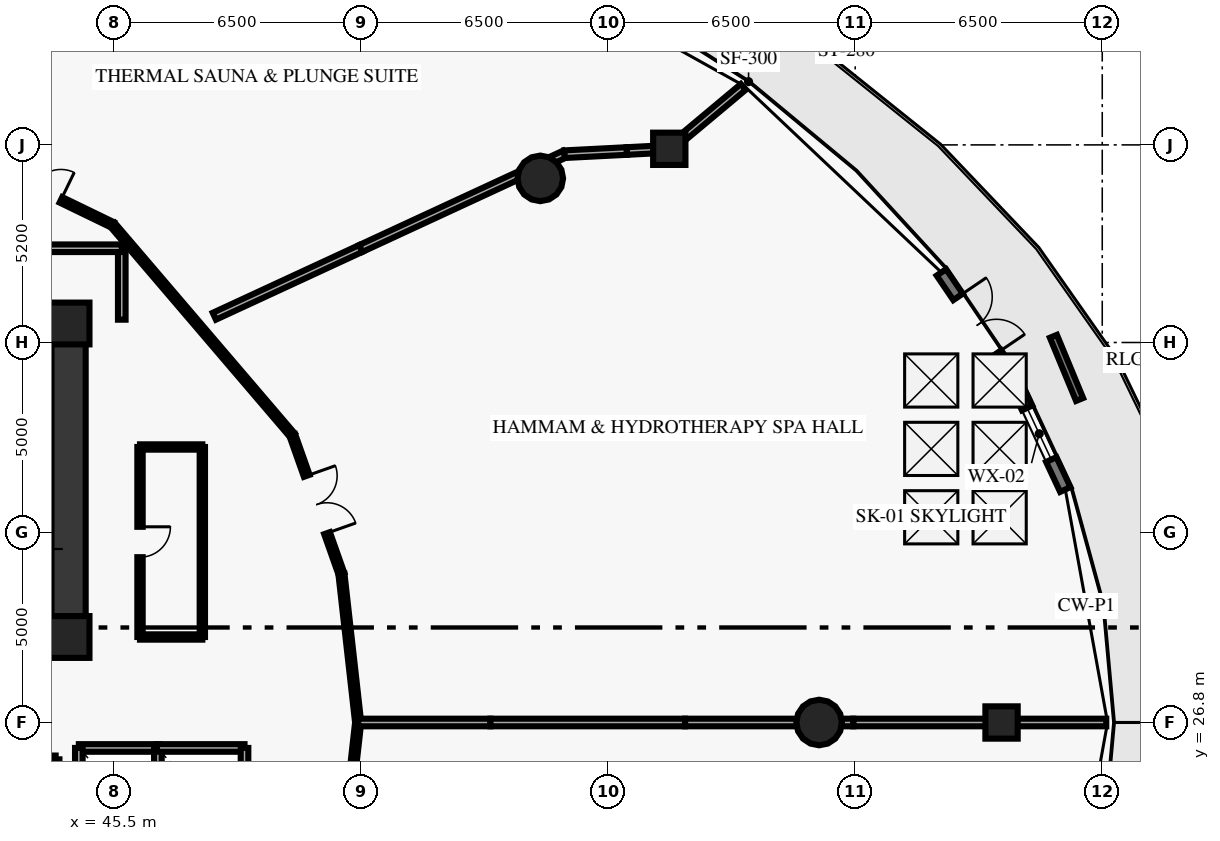
"""IFC4 building model, lengths in metres.
Left out: names, types, materials, properties, quantities, classifications, styles, units other than length and angle.
Written with IfcOpenShell. Run it as: python <this file> out.ifc"""

import sys

from ifc_helpers import new_model, si_unit, direction, frame, frame_2d, origin, origin_2d, place, context, subcontext, project, spatial, rectangle, circle, extrude, element, fill, save


model = new_model("IFC4")
c1 = context("Model", 3, precision=1e-05, world=origin(), true_north=direction((0.0, 1.0)))
c2 = subcontext(c1, "Body", "Model", "MODEL_VIEW")
j1 = project(units=[si_unit("LENGTHUNIT", "METRE"), si_unit("PLANEANGLEUNIT", "RADIAN")], contexts=[c1])
p1 = place(None, origin())
s1 = spatial("IfcSite", under=j1, at=p1, CompositionType="ELEMENT")
p2 = place(p1, origin())
s2 = spatial("IfcBuilding", under=s1, at=p2, CompositionType="ELEMENT")
p3 = place(p2, frame((0.0, 0.0, 16.0)))
s3 = spatial("IfcBuildingStorey", under=s2, at=p3, CompositionType="ELEMENT", Elevation=16.0)
for number, where, z_axis, x_axis in (
    (1, (44.3, 29.05, 0.0), (0.0, 0.0, 1.0), (1.0, 0.0, 0.0)),
    (2, (44.3, 37.3, 0.0), (0.0, 0.0, 1.0), (1.0, 0.0, 0.0)),
):
    element("IfcColumn", number, at=place(p3, frame(where, z_axis=z_axis, x_axis=x_axis)), inside=s3, PredefinedType="PILASTER", context=c2, shape_type="SweptSolid", body=[
        extrude(rectangle(XDim=1.1, YDim=1.1, at=origin_2d()), origin(), (0.0, 0.0, 1.0), 4.74),
    ])
for number, where, z_axis, x_axis in (
    (3, (64.05, 26.8, 0.0), (0.0, 0.0, 1.0), (1.0, 0.0, 0.0)),
    (4, (56.713, 41.119, 0.0), (0.0, 0.0, 1.0), (1.0, 0.0, 0.0)),
):
    element("IfcColumn", number, at=place(p3, frame(where, z_axis=z_axis, x_axis=x_axis)), inside=s3, PredefinedType="COLUMN", context=c2, shape_type="SweptSolid", body=[
        extrude(circle(Radius=0.6, at=origin_2d()), origin(), (0.0, 0.0, 1.0), 4.74),
    ])
for number, where, z_axis, x_axis in (
    (5, (68.85, 26.8, 0.0), (0.0, 0.0, 1.0), (1.0, 0.0, 0.0)),
    (6, (60.107, 41.897, 0.0), (0.0, 0.0, 1.0), (1.0, 0.0, 0.0)),
):
    element("IfcColumn", number, at=place(p3, frame(where, z_axis=z_axis, x_axis=x_axis)), inside=s3, PredefinedType="COLUMN", context=c2, shape_type="SweptSolid", body=[
        extrude(rectangle(XDim=0.85, YDim=0.85, at=origin_2d()), origin(), (0.0, 0.0, 1.0), 4.74),
    ])
p4 = place(p3, frame((44.3, 29.05, 0.0), z_axis=(0.0, 0.0, 1.0), x_axis=(0.0, 1.0, 0.0)))
e7 = element("IfcWall", 7, at=p4, inside=s3, PredefinedType="SHEAR", context=c2, shape_type="SweptSolid", body=[
    extrude(rectangle(XDim=8.35, YDim=0.9, at=frame_2d((4.175, 0.0))), origin(), (0.0, 0.0, 1.0), 4.74),
])
p5 = place(p3, frame((33.7, 29.05, 0.0), z_axis=(0.0, 0.0, 1.0), x_axis=(1.0, 0.0, 0.0)))
e8 = element("IfcWall", 8, at=p5, inside=s3, PredefinedType="SHEAR", context=c2, shape_type="SweptSolid", body=[
    extrude(rectangle(XDim=10.6, YDim=0.9, at=frame_2d((5.3, 0.0))), origin(), (0.0, 0.0, 1.0), 4.74),
])
p6 = place(p3, frame((69.155, 35.866, 0.0), z_axis=(0.0, 0.0, 1.0), x_axis=(0.423734962383, -0.905786222932, 0.0)))
e9 = element("IfcWall", 9, at=p6, inside=s3, PredefinedType="STANDARD", context=c2, shape_type="SweptSolid", body=[
    extrude(rectangle(XDim=3.24, YDim=0.3, at=frame_2d((1.62, 0.0))), origin(), (0.0, 0.0, 1.0), 4.74),
])
p7 = place(p6, frame((0.87, 0.0, 0.9)))
e10 = element("IfcOpeningElement", 10, at=p7, cuts=e9, PredefinedType="OPENING", context=c2, shape_type="SweptSolid", body=[
    extrude(rectangle(XDim=1.5, YDim=2.2, at=frame_2d((0.75, 1.1))), frame((0.0, 0.16, 0.0), z_axis=(0.0, -1.0, 0.0), x_axis=(1.0, 0.0, 0.0)), (0.0, 0.0, 1.0), 0.32),
])
p8 = place(p3, frame((67.267, 38.645, 0.0), z_axis=(0.0, 0.0, 1.0), x_axis=(0.56194026568, -0.827177815108, 0.0)))
e11 = element("IfcWall", 11, at=p8, inside=s3, PredefinedType="STANDARD", context=c2, shape_type="SweptSolid", body=[
    extrude(rectangle(XDim=3.36, YDim=0.3, at=frame_2d((1.68, 0.0))), origin(), (0.0, 0.0, 1.0), 4.74),
])
p9 = place(p8, frame((0.78, 0.0, 0.0)))
e12 = element("IfcOpeningElement", 12, at=p9, cuts=e11, PredefinedType="OPENING", context=c2, shape_type="SweptSolid", body=[
    extrude(rectangle(XDim=1.8, YDim=2.25, at=frame_2d((0.9, 1.125))), frame((0.0, 0.16, 0.0), z_axis=(0.0, -1.0, 0.0), x_axis=(1.0, 0.0, 0.0)), (0.0, 0.0, 1.0), 0.32),
])
p10 = place(p3, frame((70.215, 36.963, 0.0), z_axis=(0.0, 0.0, 1.0), x_axis=(0.382775058439, -0.923841574425, 0.0)))
e13 = element("IfcWall", 13, at=p10, inside=s3, PredefinedType="ELEMENTEDWALL", context=c2, shape_type="SweptSolid", body=[
    extrude(rectangle(XDim=1.8, YDim=0.2, at=frame_2d((0.9, 0.0))), origin(), (0.0, 0.0, 1.0), 0.65),
])
p11 = place(p3, frame((44.3, 37.4, 0.0), z_axis=(0.0, 0.0, 1.0), x_axis=(-1.0, 0.0, 0.0)))
e14 = element("IfcWall", 14, at=p11, inside=s3, PredefinedType="SHEAR", context=c2, shape_type="SweptSolid", body=[
    extrude(rectangle(XDim=3.65, YDim=0.45, at=frame_2d((1.825, 0.0))), origin(), (0.0, 0.0, 1.0), 4.74),
])
p12 = place(p11, frame((1.25, 0.0, 0.0)))
e15 = element("IfcOpeningElement", 15, at=p12, cuts=e14, PredefinedType="OPENING", context=c2, shape_type="SweptSolid", body=[
    extrude(rectangle(XDim=1.15, YDim=2.15, at=frame_2d((0.575, 1.075))), frame((0.0, 0.235, 0.0), z_axis=(0.0, -1.0, 0.0), x_axis=(1.0, 0.0, 0.0)), (0.0, 0.0, 1.0), 0.47),
])
p13 = place(p3, frame((45.7, 37.4, 0.0), z_axis=(0.0, 0.0, 1.0), x_axis=(0.0, 1.0, 0.0)))
e16 = element("IfcWall", 16, at=p13, inside=s3, PredefinedType="SOLIDWALL", context=c2, shape_type="SweptSolid", body=[
    extrude(rectangle(XDim=1.88, YDim=0.2, at=frame_2d((0.94, 0.0))), origin(), (0.0, 0.0, 1.0), 4.74),
])
p14 = place(p3, frame((45.7, 39.28, 0.0), z_axis=(0.0, 0.0, 1.0), x_axis=(-1.0, 0.0, 0.0)))
e17 = element("IfcWall", 17, at=p14, inside=s3, PredefinedType="SOLIDWALL", context=c2, shape_type="SweptSolid", body=[
    extrude(rectangle(XDim=6.6, YDim=0.2, at=frame_2d((3.3, 0.0))), origin(), (0.0, 0.0, 1.0), 4.74),
])
p15 = place(p14, frame((4.35, 0.0, 0.0)))
e18 = element("IfcOpeningElement", 18, at=p15, cuts=e17, PredefinedType="OPENING", context=c2, shape_type="SweptSolid", body=[
    extrude(rectangle(XDim=1.6, YDim=2.2, at=frame_2d((0.8, 1.1))), frame((0.0, 0.11, 0.0), z_axis=(0.0, -1.0, 0.0), x_axis=(1.0, 0.0, 0.0)), (0.0, 0.0, 1.0), 0.22),
])
p16 = place(p3, frame((44.57, 26.13, 0.0), z_axis=(0.0, 0.0, 1.0), x_axis=(1.0, 0.0, 0.0)))
e19 = element("IfcWall", 19, at=p16, inside=s3, PredefinedType="SOLIDWALL", context=c2, shape_type="SweptSolid", body=[
    extrude(rectangle(XDim=2.11, YDim=0.2, at=frame_2d((1.055, 0.0))), origin(), (0.0, 0.0, 1.0), 4.74),
])
for number, where, z_axis, x_axis in (
    (20, (44.57, 23.72, 0.0), (0.0, 0.0, 1.0), (0.0, 1.0, 0.0)),
    (21, (46.65, 23.72, 0.0), (0.0, 0.0, 1.0), (0.0, 1.0, 0.0)),
):
    element("IfcWall", number, at=place(p3, frame(where, z_axis=z_axis, x_axis=x_axis)), inside=s3, PredefinedType="SOLIDWALL", context=c2, shape_type="SweptSolid", body=[
        extrude(rectangle(XDim=2.41, YDim=0.2, at=frame_2d((1.205, 0.0))), origin(), (0.0, 0.0, 1.0), 4.74),
    ])
p17 = place(p3, frame((46.62, 26.13, 0.0), z_axis=(0.0, 0.0, 1.0), x_axis=(1.0, 0.0, 0.0)))
e22 = element("IfcWall", 22, at=p17, inside=s3, PredefinedType="SOLIDWALL", context=c2, shape_type="SweptSolid", body=[
    extrude(rectangle(XDim=2.31, YDim=0.2, at=frame_2d((1.155, 0.0))), origin(), (0.0, 0.0, 1.0), 4.74),
])
p18 = place(p3, frame((48.93, 23.72, 0.0), z_axis=(0.0, 0.0, 1.0), x_axis=(0.0, 1.0, 0.0)))
e23 = element("IfcWall", 23, at=p18, inside=s3, PredefinedType="SOLIDWALL", context=c2, shape_type="SweptSolid", body=[
    extrude(rectangle(XDim=2.41, YDim=0.2, at=frame_2d((1.205, 0.0))), origin(), (0.0, 0.0, 1.0), 4.74),
])
p19 = place(p3, frame((41.46, 25.83, 0.0), z_axis=(0.0, 0.0, 1.0), x_axis=(1.0, 0.0, 0.0)))
e24 = element("IfcWall", 24, at=p19, inside=s3, PredefinedType="SOLIDWALL", context=c2, shape_type="SweptSolid", body=[
    extrude(rectangle(XDim=2.5, YDim=0.2, at=frame_2d((1.25, 0.0))), origin(), (0.0, 0.0, 1.0), 4.74),
])
p20 = place(p3, frame((43.96, 23.42, 0.0), z_axis=(0.0, 0.0, 1.0), x_axis=(0.0, 1.0, 0.0)))
e25 = element("IfcWall", 25, at=p20, inside=s3, PredefinedType="SOLIDWALL", context=c2, shape_type="SweptSolid", body=[
    extrude(rectangle(XDim=2.41, YDim=0.2, at=frame_2d((1.205, 0.0))), origin(), (0.0, 0.0, 1.0), 4.74),
])
p21 = place(p3, frame((46.18, 34.05, 0.0), z_axis=(0.0, 0.0, 1.0), x_axis=(0.0, -1.0, 0.0)))
e26 = element("IfcWall", 26, at=p21, inside=s3, PredefinedType="PARTITIONING", context=c2, shape_type="SweptSolid", body=[
    extrude(rectangle(XDim=5.0, YDim=0.14, at=frame_2d((2.5, 0.0))), origin(), (0.0, 0.0, 1.0), 4.74),
])
p22 = place(p21, frame((2.1, 0.0, 0.0)))
e27 = element("IfcOpeningElement", 27, at=p22, cuts=e26, PredefinedType="OPENING", context=c2, shape_type="SweptSolid", body=[
    extrude(rectangle(XDim=0.8, YDim=2.05, at=frame_2d((0.4, 1.025))), frame((0.0, 0.08, 0.0), z_axis=(0.0, -1.0, 0.0), x_axis=(1.0, 0.0, 0.0)), (0.0, 0.0, 1.0), 0.16),
])
p23 = place(p3, frame((46.18, 29.05, 0.0), z_axis=(0.0, 0.0, 1.0), x_axis=(1.0, 0.0, 0.0)))
e28 = element("IfcWall", 28, at=p23, inside=s3, PredefinedType="PARTITIONING", context=c2, shape_type="SweptSolid", body=[
    extrude(rectangle(XDim=1.64, YDim=0.14, at=frame_2d((0.82, 0.0))), origin(), (0.0, 0.0, 1.0), 2.74),
])
p24 = place(p3, frame((46.18, 34.05, 0.0), z_axis=(0.0, 0.0, 1.0), x_axis=(1.0, 0.0, 0.0)))
e29 = element("IfcWall", 29, at=p24, inside=s3, PredefinedType="PARTITIONING", context=c2, shape_type="SweptSolid", body=[
    extrude(rectangle(XDim=1.64, YDim=0.14, at=frame_2d((0.82, 0.0))), origin(), (0.0, 0.0, 1.0), 4.74),
])
p25 = place(p3, frame((47.82, 29.05, 0.0), z_axis=(0.0, 0.0, 1.0), x_axis=(0.0, 1.0, 0.0)))
e30 = element("IfcWall", 30, at=p25, inside=s3, PredefinedType="PARTITIONING", context=c2, shape_type="SweptSolid", body=[
    extrude(rectangle(XDim=5.0, YDim=0.14, at=frame_2d((2.5, 0.0))), origin(), (0.0, 0.0, 1.0), 4.74),
])
p26 = place(p3, frame((51.92, 26.8, 0.0), z_axis=(0.0, 0.0, 1.0), x_axis=(-0.111731247657, 0.993738460711, 0.0)))
e31 = element("IfcWall", 31, at=p26, inside=s3, PredefinedType="PARTITIONING", context=c2, shape_type="SweptSolid", body=[
    extrude(rectangle(XDim=3.938, YDim=0.16, at=frame_2d((1.969, 0.0))), origin(), (0.0, 0.0, 1.0), 4.74),
])
p27 = place(p3, frame((50.189, 34.36, 0.0), z_axis=(0.0, 0.0, 1.0), x_axis=(0.333684770033, -0.942684716248, 0.0)))
e32 = element("IfcWall", 32, at=p27, inside=s3, PredefinedType="PARTITIONING", context=c2, shape_type="SweptSolid", body=[
    extrude(rectangle(XDim=3.869, YDim=0.16, at=frame_2d((1.935, 0.0))), origin(), (0.0, 0.0, 1.0), 4.74),
])
p28 = place(p27, frame((1.134, 0.0, 0.0)))
e33 = element("IfcOpeningElement", 33, at=p28, cuts=e32, PredefinedType="OPENING", context=c2, shape_type="SweptSolid", body=[
    extrude(rectangle(XDim=1.6, YDim=2.2, at=frame_2d((0.8, 1.1))), frame((0.0, 0.09, 0.0), z_axis=(0.0, -1.0, 0.0), x_axis=(1.0, 0.0, 0.0)), (0.0, 0.0, 1.0), 0.18),
])
p29 = place(p3, frame((50.189, 34.36, 0.0), z_axis=(0.0, 0.0, 1.0), x_axis=(-0.649652680018, 0.760231145998, 0.0)))
e34 = element("IfcWall", 34, at=p29, inside=s3, PredefinedType="PARTITIONING", context=c2, shape_type="SweptSolid", body=[
    extrude(rectangle(XDim=7.279, YDim=0.16, at=frame_2d((3.64, 0.0))), origin(), (0.0, 0.0, 1.0), 4.74),
])
p30 = place(p3, frame((42.344, 41.405, 0.0), z_axis=(0.0, 0.0, 1.0), x_axis=(0.899789784655, -0.436323668199, 0.0)))
e35 = element("IfcWall", 35, at=p30, inside=s3, PredefinedType="PARTITIONING", context=c2, shape_type="SweptSolid", body=[
    extrude(rectangle(XDim=3.463, YDim=0.16, at=frame_2d((1.731, 0.0))), origin(), (0.0, 0.0, 1.0), 4.74),
])
p31 = place(p30, frame((0.351, 0.0, 0.0)))
e36 = element("IfcOpeningElement", 36, at=p31, cuts=e35, PredefinedType="OPENING", context=c2, shape_type="SweptSolid", body=[
    extrude(rectangle(XDim=1.6, YDim=2.2, at=frame_2d((0.8, 1.1))), frame((0.0, 0.09, 0.0), z_axis=(0.0, -1.0, 0.0), x_axis=(1.0, 0.0, 0.0)), (0.0, 0.0, 1.0), 0.18),
])
p32 = place(p3, frame((51.92, 26.8, 0.0), z_axis=(0.0, 0.0, 1.0), x_axis=(-0.111724363671, -0.99373923469, 0.0)))
e37 = element("IfcWall", 37, at=p32, inside=s3, PredefinedType="PARTITIONING", context=c2, shape_type="SweptSolid", body=[
    extrude(rectangle(XDim=3.938, YDim=0.16, at=frame_2d((1.969, 0.0))), origin(), (0.0, 0.0, 1.0), 4.74),
])
p33 = place(p32, frame((1.169, 0.0, 0.0)))
e38 = element("IfcOpeningElement", 38, at=p33, cuts=e37, PredefinedType="OPENING", context=c2, shape_type="SweptSolid", body=[
    extrude(rectangle(XDim=1.6, YDim=2.2, at=frame_2d((0.8, 1.1))), frame((0.0, 0.09, 0.0), z_axis=(0.0, -1.0, 0.0), x_axis=(1.0, 0.0, 0.0)), (0.0, 0.0, 1.0), 0.18),
])
p34 = place(p3, frame((51.92, 26.8, 0.0), z_axis=(0.0, 0.0, 1.0), x_axis=(1.0, 0.0, 0.0)))
e39 = element("IfcWall", 39, at=p34, inside=s3, PredefinedType="PARTITIONING", context=c2, shape_type="SweptSolid", body=[
    extrude(rectangle(XDim=3.48, YDim=0.2, at=frame_2d((1.74, 0.0))), origin(), (0.0, 0.0, 1.0), 4.74),
])
p35 = place(p3, frame((55.4, 26.8, 0.0), z_axis=(0.0, 0.0, 1.0), x_axis=(1.0, 0.0, 0.0)))
e40 = element("IfcWall", 40, at=p35, inside=s3, PredefinedType="PARTITIONING", context=c2, shape_type="SweptSolid", body=[
    extrude(rectangle(XDim=5.122, YDim=0.2, at=frame_2d((2.561, 0.0))), origin(), (0.0, 0.0, 1.0), 4.74),
])
p36 = place(p3, frame((60.522, 26.8, 0.0), z_axis=(0.0, 0.0, 1.0), x_axis=(1.0, 0.0, 0.0)))
e41 = element("IfcWall", 41, at=p36, inside=s3, PredefinedType="PARTITIONING", context=c2, shape_type="SweptSolid", body=[
    extrude(rectangle(XDim=4.428, YDim=0.2, at=frame_2d((2.214, 0.0))), origin(), (0.0, 0.0, 1.0), 2.74),
])
p37 = place(p3, frame((64.95, 26.8, 0.0), z_axis=(0.0, 0.0, 1.0), x_axis=(1.0, 0.0, 0.0)))
e42 = element("IfcWall", 42, at=p37, inside=s3, PredefinedType="PARTITIONING", context=c2, shape_type="SweptSolid", body=[
    extrude(rectangle(XDim=3.9, YDim=0.2, at=frame_2d((1.95, 0.0))), origin(), (0.0, 0.0, 1.0), 4.28),
])
p38 = place(p3, frame((68.85, 26.8, 0.0), z_axis=(0.0, 0.0, 1.0), x_axis=(1.0, 0.0, 0.0)))
e43 = element("IfcWall", 43, at=p38, inside=s3, PredefinedType="PARTITIONING", context=c2, shape_type="SweptSolid", body=[
    extrude(rectangle(XDim=2.755, YDim=0.2, at=frame_2d((1.377, 0.0))), origin(), (0.0, 0.0, 1.0), 4.74),
])
p39 = place(p3, frame((48.136, 37.491, 0.0), z_axis=(0.0, 0.0, 1.0), x_axis=(0.907543218971, 0.419958695231, 0.0)))
e44 = element("IfcWall", 44, at=p39, inside=s3, PredefinedType="PARTITIONING", context=c2, shape_type="SweptSolid", body=[
    extrude(rectangle(XDim=4.246, YDim=0.2, at=frame_2d((2.123, 0.0))), origin(), (0.0, 0.0, 1.0), 4.74),
])
p40 = place(p3, frame((51.989, 39.274, 0.0), z_axis=(0.0, 0.0, 1.0), x_axis=(0.907468259345, 0.420120647293, 0.0)))
e45 = element("IfcWall", 45, at=p40, inside=s3, PredefinedType="PARTITIONING", context=c2, shape_type="SweptSolid", body=[
    extrude(rectangle(XDim=5.099, YDim=0.2, at=frame_2d((2.549, 0.0))), origin(), (0.0, 0.0, 1.0), 2.94),
])
p41 = place(p3, frame((56.616, 41.416, 0.0), z_axis=(0.0, 0.0, 1.0), x_axis=(0.907729224474, 0.419556498025, 0.0)))
e46 = element("IfcWall", 46, at=p41, inside=s3, PredefinedType="PARTITIONING", context=c2, shape_type="SweptSolid", body=[
    extrude(rectangle(XDim=0.808, YDim=0.2, at=frame_2d((0.404, 0.0))), origin(), (0.0, 0.0, 1.0), 4.74),
])
p42 = place(p3, frame((57.349, 41.755, 0.0), z_axis=(0.0, 0.0, 1.0), x_axis=(0.998685128887, 0.051264152576, 0.0)))
e47 = element("IfcWall", 47, at=p42, inside=s3, PredefinedType="PARTITIONING", context=c2, shape_type="SweptSolid", body=[
    extrude(rectangle(XDim=1.643, YDim=0.2, at=frame_2d((0.822, 0.0))), origin(), (0.0, 0.0, 1.0), 4.74),
])
p43 = place(p3, frame((58.99, 41.839, 0.0), z_axis=(0.0, 0.0, 1.0), x_axis=(0.998660904733, 0.051733909163, 0.0)))
e48 = element("IfcWall", 48, at=p43, inside=s3, PredefinedType="PARTITIONING", context=c2, shape_type="SweptSolid", body=[
    extrude(rectangle(XDim=1.118, YDim=0.2, at=frame_2d((0.559, 0.0))), origin(), (0.0, 0.0, 1.0), 4.28),
])
p44 = place(p3, frame((60.107, 41.897, 0.0), z_axis=(0.0, 0.0, 1.0), x_axis=(0.766903980595, 0.641761859686, 0.0)))
e49 = element("IfcWall", 49, at=p44, inside=s3, PredefinedType="PARTITIONING", context=c2, shape_type="SweptSolid", body=[
    extrude(rectangle(XDim=2.54, YDim=0.2, at=frame_2d((1.27, 0.0))), origin(), (0.0, 0.0, 1.0), 4.74),
])
p45 = place(p7, origin())
e50 = element("IfcWindow", 50, at=p45, inside=s3, PartitioningType="DOUBLE_PANEL_VERTICAL", PredefinedType="WINDOW", context=c2, shape_type="SweptSolid", body=[
    extrude(rectangle(XDim=1.5, YDim=2.2, at=frame_2d((0.75, 1.1))), frame((0.0, 0.03, 0.0), z_axis=(0.0, -1.0, 0.0), x_axis=(1.0, 0.0, 0.0)), (0.0, 0.0, 1.0), 0.06),
])
fill(e10, e50)
p46 = place(p9, origin())
e51 = element("IfcDoor", 51, at=p46, inside=s3, OperationType="DOUBLE_DOOR_SINGLE_SWING", PredefinedType="DOOR", context=c2, shape_type="SweptSolid", body=[
    extrude(rectangle(XDim=1.8, YDim=2.25, at=frame_2d((0.9, 1.125))), frame((0.0, 0.025, 0.0), z_axis=(0.0, -1.0, 0.0), x_axis=(1.0, 0.0, 0.0)), (0.0, 0.0, 1.0), 0.05),
])
fill(e12, e51)
p47 = place(p3, frame((0.0, 0.0, -0.3)))
p48 = place(p47, frame((67.0, 32.2, 0.0)))
p49 = place(p48, frame((0.0, 0.0, 0.25)))
e52 = element("IfcWindow", 52, at=p49, inside=s3, PartitioningType="SINGLE_PANEL", PredefinedType="SKYLIGHT", context=c2, shape_type="SweptSolid", body=[
    extrude(rectangle(XDim=1.4, YDim=1.4, at=origin_2d()), origin(), (0.0, 0.0, 1.0), 0.05),
])
p50 = place(p47, frame((68.8, 32.2, 0.0)))
p51 = place(p50, frame((0.0, 0.0, 0.25)))
e53 = element("IfcWindow", 53, at=p51, inside=s3, PartitioningType="SINGLE_PANEL", PredefinedType="SKYLIGHT", context=c2, shape_type="SweptSolid", body=[
    extrude(rectangle(XDim=1.4, YDim=1.4, at=origin_2d()), origin(), (0.0, 0.0, 1.0), 0.05),
])
p52 = place(p47, frame((67.0, 34.0, 0.0)))
p53 = place(p52, frame((0.0, 0.0, 0.25)))
e54 = element("IfcWindow", 54, at=p53, inside=s3, PartitioningType="SINGLE_PANEL", PredefinedType="SKYLIGHT", context=c2, shape_type="SweptSolid", body=[
    extrude(rectangle(XDim=1.4, YDim=1.4, at=origin_2d()), origin(), (0.0, 0.0, 1.0), 0.05),
])
p54 = place(p47, frame((68.8, 34.0, 0.0)))
p55 = place(p54, frame((0.0, 0.0, 0.25)))
e55 = element("IfcWindow", 55, at=p55, inside=s3, PartitioningType="SINGLE_PANEL", PredefinedType="SKYLIGHT", context=c2, shape_type="SweptSolid", body=[
    extrude(rectangle(XDim=1.4, YDim=1.4, at=origin_2d()), origin(), (0.0, 0.0, 1.0), 0.05),
])
p56 = place(p47, frame((67.0, 35.8, 0.0)))
p57 = place(p56, frame((0.0, 0.0, 0.25)))
e56 = element("IfcWindow", 56, at=p57, inside=s3, PartitioningType="SINGLE_PANEL", PredefinedType="SKYLIGHT", context=c2, shape_type="SweptSolid", body=[
    extrude(rectangle(XDim=1.4, YDim=1.4, at=origin_2d()), origin(), (0.0, 0.0, 1.0), 0.05),
])
p58 = place(p47, frame((68.8, 35.8, 0.0)))
p59 = place(p58, frame((0.0, 0.0, 0.25)))
e57 = element("IfcWindow", 57, at=p59, inside=s3, PartitioningType="SINGLE_PANEL", PredefinedType="SKYLIGHT", context=c2, shape_type="SweptSolid", body=[
    extrude(rectangle(XDim=1.4, YDim=1.4, at=origin_2d()), origin(), (0.0, 0.0, 1.0), 0.05),
])
p60 = place(p22, origin())
e58 = element("IfcDoor", 58, at=p60, inside=s3, OperationType="SINGLE_SWING_LEFT", PredefinedType="DOOR", context=c2, shape_type="SweptSolid", body=[
    extrude(rectangle(XDim=0.8, YDim=2.05, at=frame_2d((0.4, 1.025))), frame((0.0, 0.025, 0.0), z_axis=(0.0, -1.0, 0.0), x_axis=(1.0, 0.0, 0.0)), (0.0, 0.0, 1.0), 0.05),
])
fill(e27, e58)
p61 = place(p28, origin())
e59 = element("IfcDoor", 59, at=p61, inside=s3, OperationType="DOUBLE_DOOR_SINGLE_SWING", PredefinedType="DOOR", context=c2, shape_type="SweptSolid", body=[
    extrude(rectangle(XDim=1.6, YDim=2.2, at=frame_2d((0.8, 1.1))), frame((0.0, 0.025, 0.0), z_axis=(0.0, -1.0, 0.0), x_axis=(1.0, 0.0, 0.0)), (0.0, 0.0, 1.0), 0.05),
])
fill(e33, e59)
p62 = place(p31, origin())
e60 = element("IfcDoor", 60, at=p62, inside=s3, OperationType="DOUBLE_DOOR_SINGLE_SWING", PredefinedType="DOOR", context=c2, shape_type="SweptSolid", body=[
    extrude(rectangle(XDim=1.6, YDim=2.2, at=frame_2d((0.8, 1.1))), frame((0.0, 0.025, 0.0), z_axis=(0.0, -1.0, 0.0), x_axis=(1.0, 0.0, 0.0)), (0.0, 0.0, 1.0), 0.05),
])
fill(e36, e60)
save(model, sys.argv[1])
